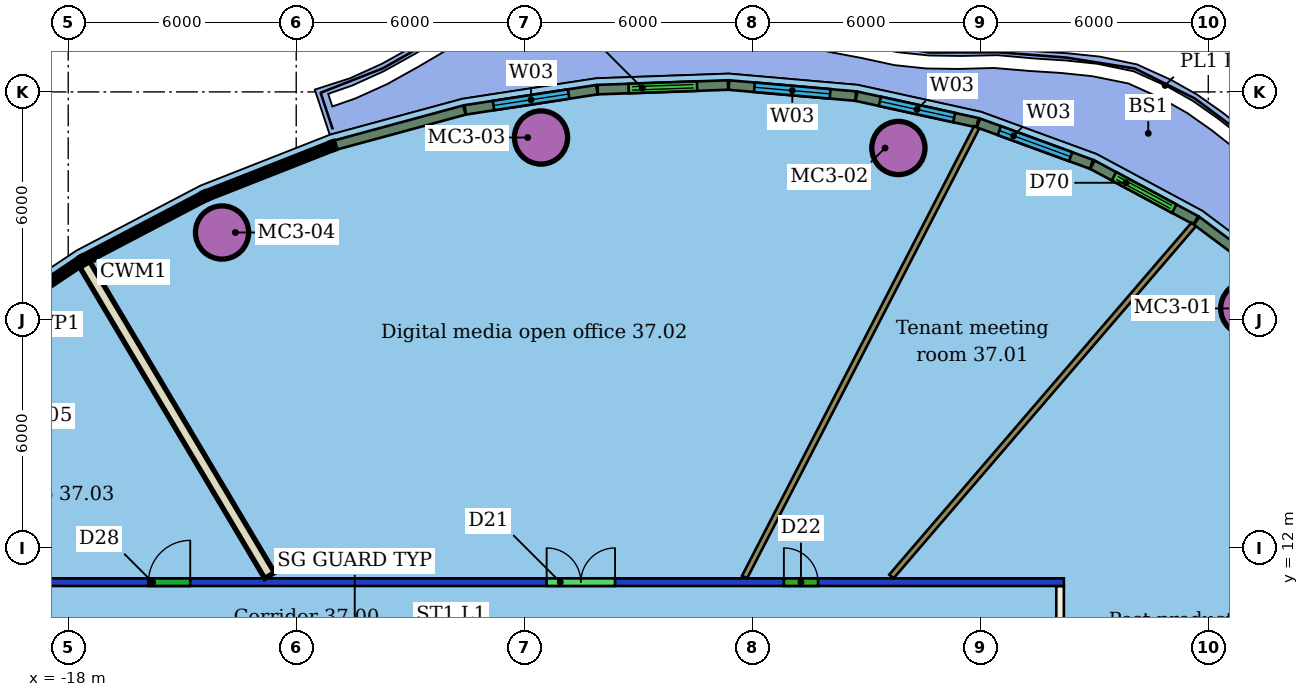
"""IFC4 building model, lengths in metres.
Left out: names, types, materials, properties, quantities, classifications, styles, units other than length and angle.
Written with IfcOpenShell. Run it as: python <this file> out.ifc"""

import sys

from ifc_helpers import new_model, si_unit, direction, frame, frame_2d, origin, origin_2d, place, context, subcontext, project, spatial, rectangle, hollow_circle, extrude, element, fill, save


model = new_model("IFC4")
c1 = context("Model", 3, precision=1e-05, world=origin(), true_north=direction((0.0, 1.0)))
c2 = subcontext(c1, "Body", "Model", "MODEL_VIEW")
j1 = project(units=[si_unit("LENGTHUNIT", "METRE"), si_unit("PLANEANGLEUNIT", "RADIAN")], contexts=[c1])
p1 = place(None, origin())
s1 = spatial("IfcSite", under=j1, at=p1, CompositionType="ELEMENT")
p2 = place(p1, origin())
s2 = spatial("IfcBuilding", under=s1, at=p2, CompositionType="ELEMENT")
p3 = place(p2, frame((0.0, 0.0, 157.8)))
s3 = spatial("IfcBuildingStorey", under=s2, at=p3, CompositionType="ELEMENT", Elevation=157.8)
for number, where, z_axis, x_axis in (
    (1, (13.026, 18.303, 0.0), (0.0, 0.0, 1.0), (1.0, 0.0, 0.0)),
    (2, (3.845, 22.524, 0.0), (0.0, 0.0, 1.0), (1.0, 0.0, 0.0)),
    (3, (-5.558, 22.8, 0.0), (0.0, 0.0, 1.0), (1.0, 0.0, 0.0)),
    (4, (-13.952, 20.301, 0.0), (0.0, 0.0, 1.0), (1.0, 0.0, 0.0)),
):
    element("IfcColumn", number, at=place(p3, frame(where, z_axis=z_axis, x_axis=x_axis)), inside=s3, PredefinedType="COLUMN", context=c2, shape_type="SweptSolid", body=[
        extrude(hollow_circle(Radius=0.7, WallThickness=0.05, at=origin_2d()), origin(), (0.0, 0.0, 1.0), 3.45),
    ])
p4 = place(p3, frame((-20.2, 11.1, 0.0), z_axis=(0.0, 0.0, 1.0), x_axis=(1.0, 0.0, 0.0)))
e5 = element("IfcWall", 5, at=p4, inside=s3, PredefinedType="PARTITIONING", context=c2, shape_type="SweptSolid", body=[
    extrude(rectangle(XDim=28.4, YDim=0.2, at=frame_2d((14.2, 0.0))), origin(), (0.0, 0.0, 1.0), 3.05),
])
p5 = place(p4, frame((21.032, 0.0, 0.0)))
e6 = element("IfcOpeningElement", 6, at=p5, cuts=e5, PredefinedType="OPENING", context=c2, shape_type="SweptSolid", body=[
    extrude(rectangle(XDim=0.9, YDim=2.1, at=frame_2d((0.45, 1.05))), frame((0.0, 0.11, 0.0), z_axis=(0.0, -1.0, 0.0), x_axis=(1.0, 0.0, 0.0)), (0.0, 0.0, 1.0), 0.22),
])
p6 = place(p4, frame((14.79, 0.0, 0.0)))
e7 = element("IfcOpeningElement", 7, at=p6, cuts=e5, PredefinedType="OPENING", context=c2, shape_type="SweptSolid", body=[
    extrude(rectangle(XDim=1.8, YDim=2.1, at=frame_2d((0.9, 1.05))), frame((0.0, 0.11, 0.0), z_axis=(0.0, -1.0, 0.0), x_axis=(1.0, 0.0, 0.0)), (0.0, 0.0, 1.0), 0.22),
])
p7 = place(p4, frame((4.311, 0.0, 0.0)))
e8 = element("IfcOpeningElement", 8, at=p7, cuts=e5, PredefinedType="OPENING", context=c2, shape_type="SweptSolid", body=[
    extrude(rectangle(XDim=1.1, YDim=2.1, at=frame_2d((0.55, 1.05))), frame((0.0, 0.11, 0.0), z_axis=(0.0, -1.0, 0.0), x_axis=(1.0, 0.0, 0.0)), (0.0, 0.0, 1.0), 0.22),
])
p8 = place(p3, frame((8.1, 11.0, 0.0), z_axis=(0.0, 0.0, 1.0), x_axis=(0.0, -1.0, 0.0)))
e9 = element("IfcWall", 9, at=p8, inside=s3, PredefinedType="PARTITIONING", context=c2, shape_type="SweptSolid", body=[
    extrude(rectangle(XDim=22.0, YDim=0.2, at=frame_2d((11.0, 0.0))), origin(), (0.0, 0.0, 1.0), 3.45),
])
p9 = place(p8, frame((13.053, 0.0, 0.0)))
e10 = element("IfcOpeningElement", 10, at=p9, cuts=e9, PredefinedType="OPENING", context=c2, shape_type="SweptSolid", body=[
    extrude(rectangle(XDim=1.8, YDim=2.1, at=frame_2d((0.9, 1.05))), frame((0.0, 0.11, 0.0), z_axis=(0.0, -1.0, 0.0), x_axis=(1.0, 0.0, 0.0)), (0.0, 0.0, 1.0), 0.22),
])
p10 = place(p8, frame((5.243, 0.0, 0.0)))
e11 = element("IfcOpeningElement", 11, at=p10, cuts=e9, PredefinedType="OPENING", context=c2, shape_type="SweptSolid", body=[
    extrude(rectangle(XDim=1.8, YDim=2.1, at=frame_2d((0.9, 1.05))), frame((0.0, 0.11, 0.0), z_axis=(0.0, -1.0, 0.0), x_axis=(1.0, 0.0, 0.0)), (0.0, 0.0, 1.0), 0.22),
])
p11 = place(p3, frame((11.616, 20.511, 0.0), z_axis=(0.0, 0.0, 1.0), x_axis=(-0.6515386605, -0.758615432135, 0.0)))
e12 = element("IfcWall", 12, at=p11, inside=s3, PredefinedType="PARTITIONING", context=c2, shape_type="SweptSolid", body=[
    extrude(rectangle(XDim=12.21, YDim=0.15, at=frame_2d((6.105, 0.0))), origin(), (0.0, 0.0, 1.0), 3.45),
])
p12 = place(p3, frame((5.905, 23.067, 0.0), z_axis=(0.0, 0.0, 1.0), x_axis=(-0.458603221977, -0.888641145116, 0.0)))
e13 = element("IfcWall", 13, at=p12, inside=s3, PredefinedType="PARTITIONING", context=c2, shape_type="SweptSolid", body=[
    extrude(rectangle(XDim=13.316, YDim=0.15, at=frame_2d((6.658, 0.0))), origin(), (0.0, 0.0, 1.0), 3.45),
])
p13 = place(p3, frame((-17.564, 19.461, 0.0), z_axis=(0.0, 0.0, 1.0), x_axis=(0.510836754181, -0.859677736467, 0.0)))
e14 = element("IfcWall", 14, at=p13, inside=s3, PredefinedType="PARTITIONING", context=c2, shape_type="SweptSolid", body=[
    extrude(rectangle(XDim=9.52, YDim=0.3, at=frame_2d((4.76, 0.0))), origin(), (0.0, 0.0, 1.0), 3.45),
])
p14 = place(p3, frame((14.08, 18.826, 0.0), z_axis=(0.0, 0.0, 1.0), x_axis=(-0.800953148143, 0.598727028353, 0.0)))
e15 = element("IfcWall", 15, at=p14, inside=s3, PredefinedType="SOLIDWALL", context=c2, shape_type="SweptSolid", body=[
    extrude(rectangle(XDim=2.978, YDim=0.25, at=frame_2d((1.489, 0.0))), origin(), (0.0, 0.0, 1.0), 3.1),
])
p15 = place(p3, frame((11.672, 20.623, 0.0), z_axis=(0.0, 0.0, 1.0), x_axis=(-0.880950483719, 0.473208458541, 0.0)))
e16 = element("IfcWall", 16, at=p15, inside=s3, PredefinedType="SOLIDWALL", context=c2, shape_type="SweptSolid", body=[
    extrude(rectangle(XDim=3.088, YDim=0.25, at=frame_2d((1.544, 0.0))), origin(), (0.0, 0.0, 1.0), 3.1),
])
p16 = place(p15, frame((0.644, 0.0, 0.0)))
e17 = element("IfcOpeningElement", 17, at=p16, cuts=e16, PredefinedType="OPENING", context=c2, shape_type="SweptSolid", body=[
    extrude(rectangle(XDim=1.8, YDim=2.4, at=frame_2d((0.9, 1.2))), frame((0.0, 0.135, 0.0), z_axis=(0.0, -1.0, 0.0), x_axis=(1.0, 0.0, 0.0)), (0.0, 0.0, 1.0), 0.27),
])
p17 = place(p3, frame((8.928, 22.095, 0.0), z_axis=(0.0, 0.0, 1.0), x_axis=(-0.93919375703, 0.343387662498, 0.0)))
e18 = element("IfcWall", 18, at=p17, inside=s3, PredefinedType="SOLIDWALL", context=c2, shape_type="SweptSolid", body=[
    extrude(rectangle(XDim=3.169, YDim=0.25, at=frame_2d((1.585, 0.0))), origin(), (0.0, 0.0, 1.0), 3.1),
])
p18 = place(p17, frame((0.585, 0.0, 0.9)))
e19 = element("IfcOpeningElement", 19, at=p18, cuts=e18, PredefinedType="OPENING", context=c2, shape_type="SweptSolid", body=[
    extrude(rectangle(XDim=2.0, YDim=2.1, at=frame_2d((1.0, 1.05))), frame((0.0, 0.135, 0.0), z_axis=(0.0, -1.0, 0.0), x_axis=(1.0, 0.0, 0.0)), (0.0, 0.0, 1.0), 0.27),
])
p19 = place(p3, frame((5.927, 23.19, 0.0), z_axis=(0.0, 0.0, 1.0), x_axis=(-0.976913214514, 0.213636540199, 0.0)))
e20 = element("IfcWall", 20, at=p19, inside=s3, PredefinedType="SOLIDWALL", context=c2, shape_type="SweptSolid", body=[
    extrude(rectangle(XDim=3.258, YDim=0.25, at=frame_2d((1.629, 0.0))), origin(), (0.0, 0.0, 1.0), 3.1),
])
p20 = place(p19, frame((0.629, 0.0, 0.9)))
e21 = element("IfcOpeningElement", 21, at=p20, cuts=e20, PredefinedType="OPENING", context=c2, shape_type="SweptSolid", body=[
    extrude(rectangle(XDim=2.0, YDim=2.1, at=frame_2d((1.0, 1.05))), frame((0.0, 0.135, 0.0), z_axis=(0.0, -1.0, 0.0), x_axis=(1.0, 0.0, 0.0)), (0.0, 0.0, 1.0), 0.27),
])
p21 = place(p3, frame((2.721, 23.89, 0.0), z_axis=(0.0, 0.0, 1.0), x_axis=(-0.996225793942, 0.086799582281, 0.0)))
e22 = element("IfcWall", 22, at=p21, inside=s3, PredefinedType="SOLIDWALL", context=c2, shape_type="SweptSolid", body=[
    extrude(rectangle(XDim=3.347, YDim=0.25, at=frame_2d((1.674, 0.0))), origin(), (0.0, 0.0, 1.0), 3.1),
])
p22 = place(p21, frame((0.674, 0.0, 0.9)))
e23 = element("IfcOpeningElement", 23, at=p22, cuts=e22, PredefinedType="OPENING", context=c2, shape_type="SweptSolid", body=[
    extrude(rectangle(XDim=2.0, YDim=2.1, at=frame_2d((1.0, 1.05))), frame((0.0, 0.135, 0.0), z_axis=(0.0, -1.0, 0.0), x_axis=(1.0, 0.0, 0.0)), (0.0, 0.0, 1.0), 0.27),
])
p23 = place(p3, frame((-0.637, 24.181, 0.0), z_axis=(0.0, 0.0, 1.0), x_axis=(-0.9993794249, -0.035224495537, 0.0)))
e24 = element("IfcWall", 24, at=p23, inside=s3, PredefinedType="SOLIDWALL", context=c2, shape_type="SweptSolid", body=[
    extrude(rectangle(XDim=3.431, YDim=0.25, at=frame_2d((1.715, 0.0))), origin(), (0.0, 0.0, 1.0), 3.1),
])
p24 = place(p23, frame((0.816, 0.0, 0.0)))
e25 = element("IfcOpeningElement", 25, at=p24, cuts=e24, PredefinedType="OPENING", context=c2, shape_type="SweptSolid", body=[
    extrude(rectangle(XDim=1.8, YDim=2.4, at=frame_2d((0.9, 1.2))), frame((0.0, 0.135, 0.0), z_axis=(0.0, -1.0, 0.0), x_axis=(1.0, 0.0, 0.0)), (0.0, 0.0, 1.0), 0.27),
])
p25 = place(p3, frame((-4.089, 24.058, 0.0), z_axis=(0.0, 0.0, 1.0), x_axis=(-0.98845290294, -0.151528408789, 0.0)))
e26 = element("IfcWall", 26, at=p25, inside=s3, PredefinedType="SOLIDWALL", context=c2, shape_type="SweptSolid", body=[
    extrude(rectangle(XDim=3.504, YDim=0.25, at=frame_2d((1.752, 0.0))), origin(), (0.0, 0.0, 1.0), 3.1),
])
p26 = place(p25, frame((0.752, 0.0, 0.9)))
e27 = element("IfcOpeningElement", 27, at=p26, cuts=e26, PredefinedType="OPENING", context=c2, shape_type="SweptSolid", body=[
    extrude(rectangle(XDim=2.0, YDim=2.1, at=frame_2d((1.0, 1.05))), frame((0.0, 0.135, 0.0), z_axis=(0.0, -1.0, 0.0), x_axis=(1.0, 0.0, 0.0)), (0.0, 0.0, 1.0), 0.27),
])
p27 = place(p3, frame((-7.574, 23.522, 0.0), z_axis=(0.0, 0.0, 1.0), x_axis=(-0.965135872227, -0.261749399505, 0.0)))
e28 = element("IfcWall", 28, at=p27, inside=s3, PredefinedType="SOLIDWALL", context=c2, shape_type="SweptSolid", body=[
    extrude(rectangle(XDim=3.519, YDim=0.25, at=frame_2d((1.76, 0.0))), origin(), (0.0, 0.0, 1.0), 3.1),
])
p28 = place(p5, origin())
e29 = element("IfcDoor", 29, at=p28, inside=s3, OperationType="SINGLE_SWING_LEFT", PredefinedType="DOOR", context=c2, shape_type="SweptSolid", body=[
    extrude(rectangle(XDim=0.9, YDim=2.1, at=frame_2d((0.45, 1.05))), frame((0.0, 0.025, 0.0), z_axis=(0.0, -1.0, 0.0), x_axis=(1.0, 0.0, 0.0)), (0.0, 0.0, 1.0), 0.05),
])
fill(e6, e29)
p29 = place(p6, origin())
e30 = element("IfcDoor", 30, at=p29, inside=s3, OperationType="DOUBLE_DOOR_SINGLE_SWING", PredefinedType="DOOR", context=c2, shape_type="SweptSolid", body=[
    extrude(rectangle(XDim=1.8, YDim=2.1, at=frame_2d((0.9, 1.05))), frame((0.0, 0.025, 0.0), z_axis=(0.0, -1.0, 0.0), x_axis=(1.0, 0.0, 0.0)), (0.0, 0.0, 1.0), 0.05),
])
fill(e7, e30)
p30 = place(p7, origin())
e31 = element("IfcDoor", 31, at=p30, inside=s3, OperationType="SINGLE_SWING_RIGHT", PredefinedType="DOOR", context=c2, shape_type="SweptSolid", body=[
    extrude(rectangle(XDim=1.1, YDim=2.1, at=frame_2d((0.55, 1.05))), frame((0.0, 0.025, 0.0), z_axis=(0.0, -1.0, 0.0), x_axis=(1.0, 0.0, 0.0)), (0.0, 0.0, 1.0), 0.05),
])
fill(e8, e31)
p31 = place(p16, origin())
e32 = element("IfcDoor", 32, at=p31, inside=s3, OperationType="DOUBLE_DOOR_SLIDING", PredefinedType="DOOR", context=c2, shape_type="SweptSolid", body=[
    extrude(rectangle(XDim=1.8, YDim=2.4, at=frame_2d((0.9, 1.2))), frame((0.0, 0.025, 0.0), z_axis=(0.0, -1.0, 0.0), x_axis=(1.0, 0.0, 0.0)), (0.0, 0.0, 1.0), 0.05),
])
fill(e17, e32)
p32 = place(p18, origin())
e33 = element("IfcWindow", 33, at=p32, inside=s3, PartitioningType="SINGLE_PANEL", PredefinedType="WINDOW", context=c2, shape_type="SweptSolid", body=[
    extrude(rectangle(XDim=2.0, YDim=2.1, at=frame_2d((1.0, 1.05))), frame((0.0, 0.03, 0.0), z_axis=(0.0, -1.0, 0.0), x_axis=(1.0, 0.0, 0.0)), (0.0, 0.0, 1.0), 0.06),
])
fill(e19, e33)
p33 = place(p20, origin())
e34 = element("IfcWindow", 34, at=p33, inside=s3, PartitioningType="SINGLE_PANEL", PredefinedType="WINDOW", context=c2, shape_type="SweptSolid", body=[
    extrude(rectangle(XDim=2.0, YDim=2.1, at=frame_2d((1.0, 1.05))), frame((0.0, 0.03, 0.0), z_axis=(0.0, -1.0, 0.0), x_axis=(1.0, 0.0, 0.0)), (0.0, 0.0, 1.0), 0.06),
])
fill(e21, e34)
p34 = place(p22, origin())
e35 = element("IfcWindow", 35, at=p34, inside=s3, PartitioningType="SINGLE_PANEL", PredefinedType="WINDOW", context=c2, shape_type="SweptSolid", body=[
    extrude(rectangle(XDim=2.0, YDim=2.1, at=frame_2d((1.0, 1.05))), frame((0.0, 0.03, 0.0), z_axis=(0.0, -1.0, 0.0), x_axis=(1.0, 0.0, 0.0)), (0.0, 0.0, 1.0), 0.06),
])
fill(e23, e35)
p35 = place(p24, origin())
e36 = element("IfcDoor", 36, at=p35, inside=s3, OperationType="DOUBLE_DOOR_SLIDING", PredefinedType="DOOR", context=c2, shape_type="SweptSolid", body=[
    extrude(rectangle(XDim=1.8, YDim=2.4, at=frame_2d((0.9, 1.2))), frame((0.0, 0.025, 0.0), z_axis=(0.0, -1.0, 0.0), x_axis=(1.0, 0.0, 0.0)), (0.0, 0.0, 1.0), 0.05),
])
fill(e25, e36)
p36 = place(p26, origin())
e37 = element("IfcWindow", 37, at=p36, inside=s3, PartitioningType="SINGLE_PANEL", PredefinedType="WINDOW", context=c2, shape_type="SweptSolid", body=[
    extrude(rectangle(XDim=2.0, YDim=2.1, at=frame_2d((1.0, 1.05))), frame((0.0, 0.03, 0.0), z_axis=(0.0, -1.0, 0.0), x_axis=(1.0, 0.0, 0.0)), (0.0, 0.0, 1.0), 0.06),
])
fill(e27, e37)
save(model, sys.argv[1])
